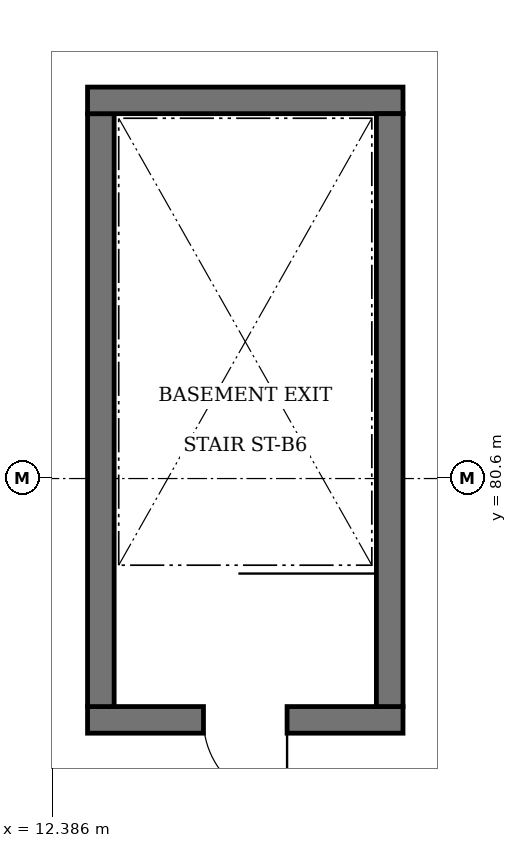
"""IFC4 building model, lengths in metres.
Left out: names, types, materials, properties, quantities, classifications, styles, units other than length and angle.
Written with IfcOpenShell. Run it as: python <this file> out.ifc"""

import sys

from ifc_helpers import new_model, si_unit, direction, frame, frame_2d, origin, place, context, subcontext, project, spatial, rectangle, extrude, element, fill, save


model = new_model("IFC4")
c1 = context("Model", 3, precision=1e-05, world=origin(), true_north=direction((0.0, 1.0)))
c2 = subcontext(c1, "Body", "Model", "MODEL_VIEW")
j1 = project(units=[si_unit("LENGTHUNIT", "METRE"), si_unit("PLANEANGLEUNIT", "RADIAN")], contexts=[c1])
p1 = place(None, origin())
s1 = spatial("IfcSite", under=j1, at=p1, CompositionType="ELEMENT")
p2 = place(p1, origin())
s2 = spatial("IfcBuilding", under=s1, at=p2, CompositionType="ELEMENT")
p3 = place(p2, origin())
s3 = spatial("IfcBuildingStorey", under=s2, at=p3, CompositionType="ELEMENT", Elevation=0.0)
p4 = place(p3, frame((17.0, 77.425, 0.0), z_axis=(0.0, 0.0, 1.0), x_axis=(-1.0, 0.0, 0.0)))
e1 = element("IfcWall", 1, at=p4, inside=s3, PredefinedType="SOLIDWALL", context=c2, shape_type="SweptSolid", body=[
    extrude(rectangle(XDim=4.15, YDim=0.35, at=frame_2d((2.075, 0.0))), origin(), (0.0, 0.0, 1.0), 4.54),
])
p5 = place(p4, frame((1.525, 0.0, 0.0)))
e2 = element("IfcOpeningElement", 2, at=p5, cuts=e1, PredefinedType="OPENING", context=c2, shape_type="SweptSolid", body=[
    extrude(rectangle(XDim=1.1, YDim=2.15, at=frame_2d((0.55, 1.075))), frame((0.0, 0.195, 0.0), z_axis=(0.0, -1.0, 0.0), x_axis=(1.0, 0.0, 0.0)), (0.0, 0.0, 1.0), 0.39),
])
p6 = place(p3, frame((13.025, 77.6, 0.0), z_axis=(0.0, 0.0, 1.0), x_axis=(0.0, 1.0, 0.0)))
e3 = element("IfcWall", 3, at=p6, inside=s3, PredefinedType="SOLIDWALL", context=c2, shape_type="SweptSolid", body=[
    extrude(rectangle(XDim=7.8, YDim=0.35, at=frame_2d((3.9, 0.0))), origin(), (0.0, 0.0, 1.0), 4.54),
])
p7 = place(p3, frame((12.85, 85.575, 0.0), z_axis=(0.0, 0.0, 1.0), x_axis=(1.0, 0.0, 0.0)))
e4 = element("IfcWall", 4, at=p7, inside=s3, PredefinedType="SOLIDWALL", context=c2, shape_type="SweptSolid", body=[
    extrude(rectangle(XDim=4.15, YDim=0.35, at=frame_2d((2.075, 0.0))), origin(), (0.0, 0.0, 1.0), 4.54),
])
p8 = place(p3, frame((16.825, 85.4, 0.0), z_axis=(0.0, 0.0, 1.0), x_axis=(0.0, -1.0, 0.0)))
e5 = element("IfcWall", 5, at=p8, inside=s3, PredefinedType="SOLIDWALL", context=c2, shape_type="SweptSolid", body=[
    extrude(rectangle(XDim=7.8, YDim=0.35, at=frame_2d((3.9, 0.0))), origin(), (0.0, 0.0, 1.0), 4.54),
])
p9 = place(p5, origin())
e6 = element("IfcDoor", 6, at=p9, inside=s3, OperationType="SINGLE_SWING_LEFT", PredefinedType="DOOR", context=c2, shape_type="SweptSolid", body=[
    extrude(rectangle(XDim=1.1, YDim=2.15, at=frame_2d((0.55, 1.075))), frame((0.0, 0.025, 0.0), z_axis=(0.0, -1.0, 0.0), x_axis=(1.0, 0.0, 0.0)), (0.0, 0.0, 1.0), 0.05),
])
fill(e2, e6)
save(model, sys.argv[1])
